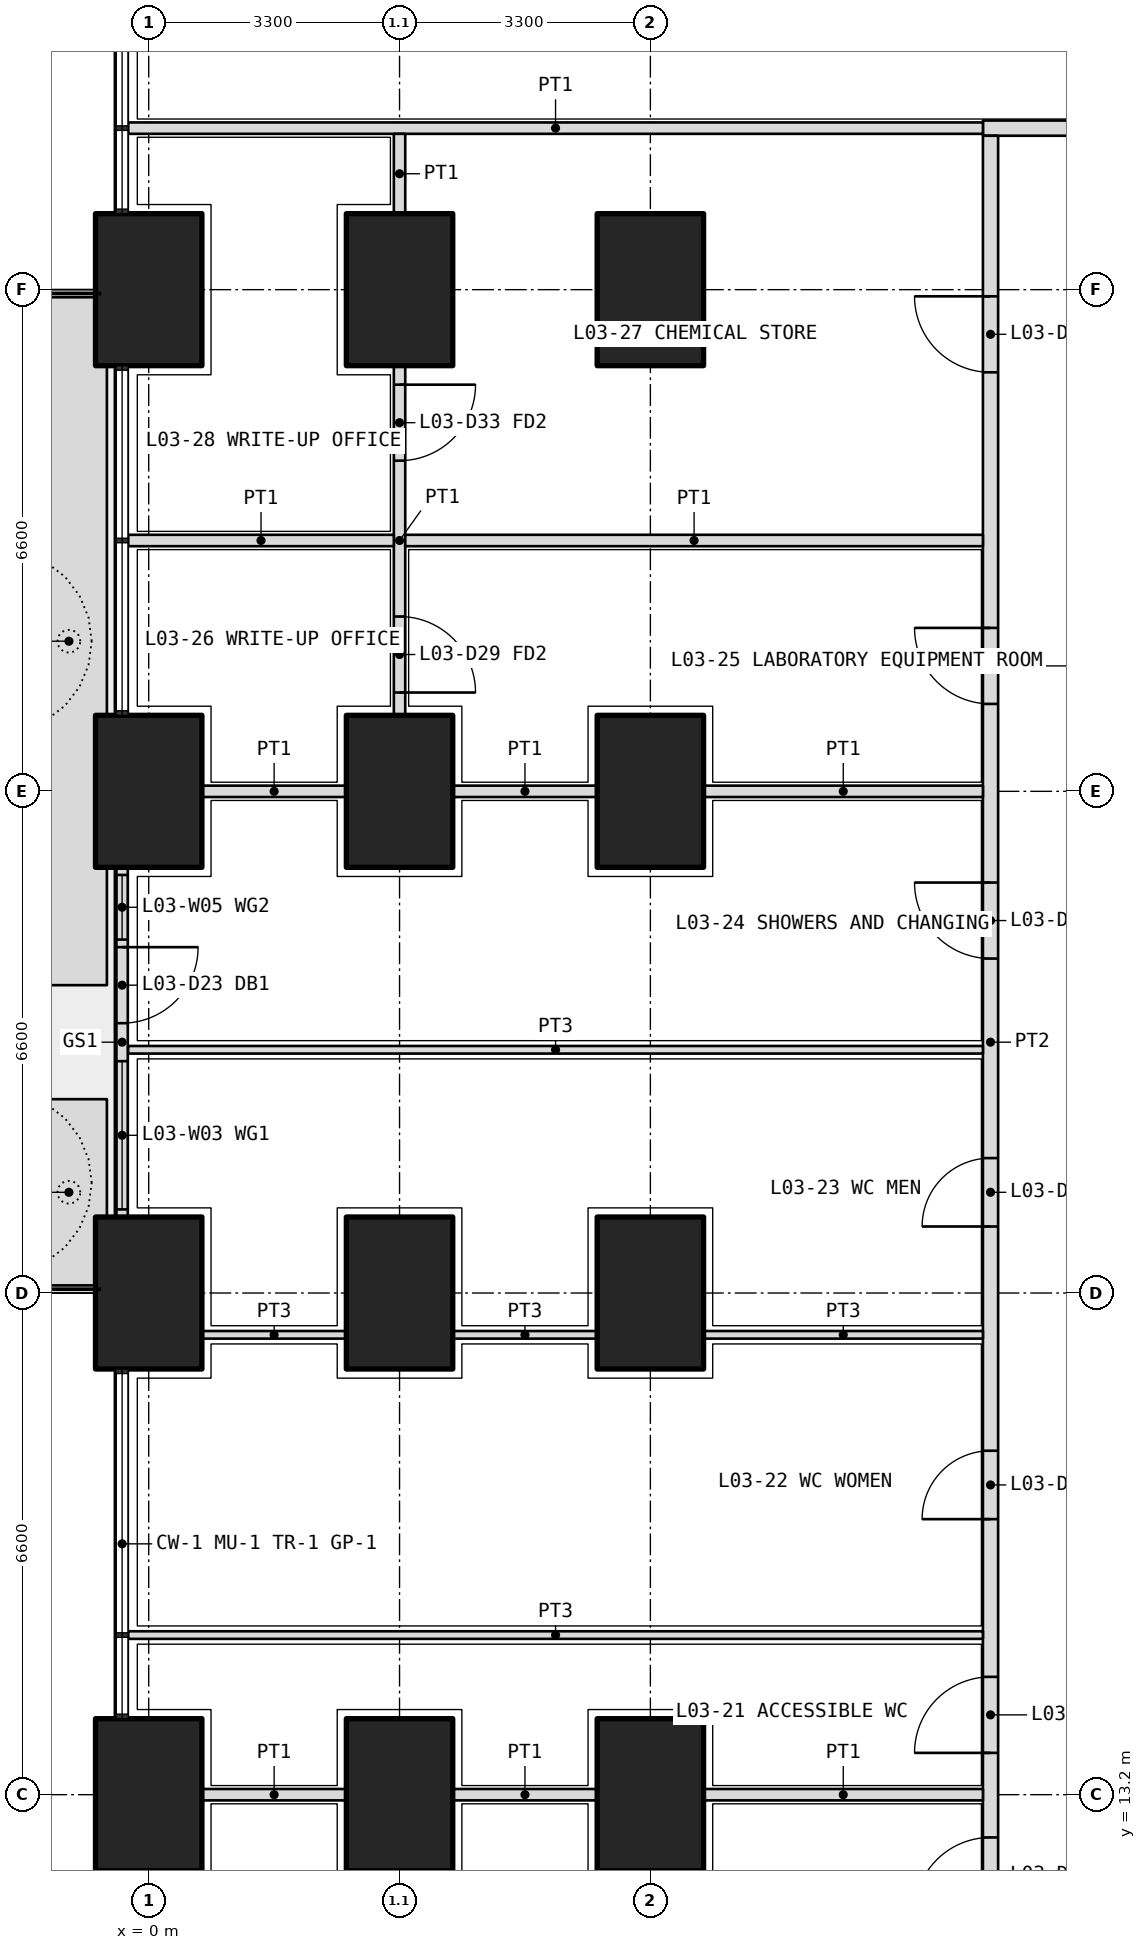
"""IFC4 building model, lengths in metres.
Left out: names, types, materials, properties, quantities, classifications, styles, units other than length and angle.
Written with IfcOpenShell. Run it as: python <this file> out.ifc"""

import sys

from ifc_helpers import new_model, si_unit, direction, frame, frame_2d, origin, origin_2d, place, context, subcontext, project, spatial, polyline, rectangle, outline, extrude, element, fill, save


model = new_model("IFC4")
c1 = context("Model", 3, precision=1e-05, world=origin(), true_north=direction((0.0, 1.0)))
c2 = subcontext(c1, "Body", "Model", "MODEL_VIEW")
j1 = project(units=[si_unit("LENGTHUNIT", "METRE"), si_unit("PLANEANGLEUNIT", "RADIAN")], contexts=[c1])
p1 = place(None, origin())
s1 = spatial("IfcSite", under=j1, at=p1, CompositionType="ELEMENT")
p2 = place(p1, origin())
s2 = spatial("IfcBuilding", under=s1, at=p2, CompositionType="ELEMENT")
p3 = place(p2, frame((0.0, 0.0, 17.1)))
s3 = spatial("IfcBuildingStorey", under=s2, at=p3, CompositionType="ELEMENT", Elevation=17.1)
for number, where, z_axis, x_axis in (
    (1, (0.0, 13.2, 0.0), (0.0, 0.0, 1.0), (0.0, 1.0, 0.0)),
    (2, (0.0, 19.8, 0.0), (0.0, 0.0, 1.0), (0.0, 1.0, 0.0)),
    (3, (0.0, 26.4, 0.0), (0.0, 0.0, 1.0), (0.0, 1.0, 0.0)),
    (4, (0.0, 33.0, 0.0), (0.0, 0.0, 1.0), (0.0, 1.0, 0.0)),
    (5, (3.3, 13.2, 0.0), (0.0, 0.0, 1.0), (0.0, 1.0, 0.0)),
    (6, (3.3, 19.8, 0.0), (0.0, 0.0, 1.0), (0.0, 1.0, 0.0)),
    (7, (3.3, 26.4, 0.0), (0.0, 0.0, 1.0), (0.0, 1.0, 0.0)),
    (8, (3.3, 33.0, 0.0), (0.0, 0.0, 1.0), (0.0, 1.0, 0.0)),
    (9, (6.6, 13.2, 0.0), (0.0, 0.0, 1.0), (0.0, 1.0, 0.0)),
    (10, (6.6, 19.8, 0.0), (0.0, 0.0, 1.0), (0.0, 1.0, 0.0)),
    (11, (6.6, 26.4, 0.0), (0.0, 0.0, 1.0), (0.0, 1.0, 0.0)),
    (12, (6.6, 33.0, 0.0), (0.0, 0.0, 1.0), (0.0, 1.0, 0.0)),
):
    element("IfcColumn", number, at=place(p3, frame(where, z_axis=z_axis, x_axis=x_axis)), inside=s3, PredefinedType="COLUMN", context=c2, shape_type="SweptSolid", body=[
        extrude(rectangle(XDim=2.0, YDim=1.4, at=origin_2d()), origin(), (0.0, 0.0, 1.0), 4.2),
    ])
p4 = place(p3, origin())
e13 = element("IfcWall", 13, at=p4, inside=s3, PredefinedType="USERDEFINED", context=c2, shape_type="SweptSolid", body=[
    extrude(outline(polyline([(-1.55, 19.9), (-0.55, 19.9), (-0.55, 22.35), (-1.55, 22.35), (-1.55, 19.9)]), holes=[polyline([(-1.4, 20.05), (-0.7, 20.05), (-0.7, 22.2), (-1.4, 22.2), (-1.4, 20.05)])]), origin(), (0.0, 0.0, 1.0), 1.05),
])
p5 = place(p3, origin())
e14 = element("IfcWall", 14, at=p5, inside=s3, PredefinedType="USERDEFINED", context=c2, shape_type="SweptSolid", body=[
    extrude(outline(polyline([(-1.55, 23.85), (-0.55, 23.85), (-0.55, 32.9), (-1.55, 32.9), (-1.55, 23.85)]), holes=[polyline([(-1.4, 24.0), (-0.7, 24.0), (-0.7, 32.75), (-1.4, 32.75), (-1.4, 24.0)])]), origin(), (0.0, 0.0, 1.0), 1.05),
])
p6 = place(p3, frame((-0.35, 25.4, 0.0), z_axis=(0.0, 0.0, 1.0), x_axis=(0.0, -1.0, 0.0)))
e15 = element("IfcWall", 15, at=p6, inside=s3, PredefinedType="SOLIDWALL", context=c2, shape_type="SweptSolid", body=[
    extrude(rectangle(XDim=4.6, YDim=0.15, at=frame_2d((2.3, 0.0))), origin(), (0.0, 0.0, 1.0), 2.7),
])
p7 = place(p6, frame((1.05, 0.0, 0.0)))
e16 = element("IfcOpeningElement", 16, at=p7, cuts=e15, PredefinedType="OPENING", context=c2, shape_type="SweptSolid", body=[
    extrude(rectangle(XDim=1.0, YDim=2.4, at=frame_2d((0.5, 1.2))), frame((0.0, 0.085, 0.0), z_axis=(0.0, -1.0, 0.0), x_axis=(1.0, 0.0, 0.0)), (0.0, 0.0, 1.0), 0.17),
])
p8 = place(p6, frame((0.1, 0.0, 0.1)))
e17 = element("IfcOpeningElement", 17, at=p8, cuts=e15, PredefinedType="OPENING", context=c2, shape_type="SweptSolid", body=[
    extrude(rectangle(XDim=0.85, YDim=2.3, at=frame_2d((0.425, 1.15))), frame((0.0, 0.085, 0.0), z_axis=(0.0, -1.0, 0.0), x_axis=(1.0, 0.0, 0.0)), (0.0, 0.0, 1.0), 0.17),
])
p9 = place(p6, frame((2.55, 0.0, 0.1)))
e18 = element("IfcOpeningElement", 18, at=p9, cuts=e15, PredefinedType="OPENING", context=c2, shape_type="SweptSolid", body=[
    extrude(rectangle(XDim=1.95, YDim=2.3, at=frame_2d((0.975, 1.15))), frame((0.0, 0.085, 0.0), z_axis=(0.0, -1.0, 0.0), x_axis=(1.0, 0.0, 0.0)), (0.0, 0.0, 1.0), 0.17),
])
p10 = place(p3, frame((10.975, 35.125, 0.0), z_axis=(0.0, 0.0, 1.0), x_axis=(1.0, 0.0, 0.0)))
e19 = element("IfcWall", 19, at=p10, inside=s3, PredefinedType="PARTITIONING", context=c2, shape_type="SweptSolid", body=[
    extrude(rectangle(XDim=30.85, YDim=0.2, at=frame_2d((15.425, 0.0))), origin(), (0.0, 0.0, 1.0), 2.85),
])
p11 = place(p10, frame((7.262, 0.0, 0.0)))
e20 = element("IfcOpeningElement", 20, at=p11, cuts=e19, PredefinedType="OPENING", context=c2, shape_type="SweptSolid", body=[
    extrude(rectangle(XDim=1.0, YDim=2.1, at=frame_2d((0.5, 1.05))), frame((0.0, 0.11, 0.0), z_axis=(0.0, -1.0, 0.0), x_axis=(1.0, 0.0, 0.0)), (0.0, 0.0, 1.0), 0.22),
])
p12 = place(p10, frame((22.587, 0.0, 0.0)))
e21 = element("IfcOpeningElement", 21, at=p12, cuts=e19, PredefinedType="OPENING", context=c2, shape_type="SweptSolid", body=[
    extrude(rectangle(XDim=1.0, YDim=2.1, at=frame_2d((0.5, 1.05))), frame((0.0, 0.11, 0.0), z_axis=(0.0, -1.0, 0.0), x_axis=(1.0, 0.0, 0.0)), (0.0, 0.0, 1.0), 0.22),
])
p13 = place(p3, frame((11.075, 11.175, 0.0), z_axis=(0.0, 0.0, 1.0), x_axis=(0.0, 1.0, 0.0)))
e22 = element("IfcWall", 22, at=p13, inside=s3, PredefinedType="PARTITIONING", context=c2, shape_type="SweptSolid", body=[
    extrude(rectangle(XDim=23.85, YDim=0.2, at=frame_2d((11.925, 0.0))), origin(), (0.0, 0.0, 1.0), 2.85),
])
p14 = place(p13, frame((0.462, 0.0, 0.0)))
e23 = element("IfcOpeningElement", 23, at=p14, cuts=e22, PredefinedType="OPENING", context=c2, shape_type="SweptSolid", body=[
    extrude(rectangle(XDim=1.0, YDim=2.1, at=frame_2d((0.5, 1.05))), frame((0.0, 0.11, 0.0), z_axis=(0.0, -1.0, 0.0), x_axis=(1.0, 0.0, 0.0)), (0.0, 0.0, 1.0), 0.22),
])
p15 = place(p13, frame((2.575, 0.0, 0.0)))
e24 = element("IfcOpeningElement", 24, at=p15, cuts=e22, PredefinedType="OPENING", context=c2, shape_type="SweptSolid", body=[
    extrude(rectangle(XDim=1.0, YDim=2.1, at=frame_2d((0.5, 1.05))), frame((0.0, 0.11, 0.0), z_axis=(0.0, -1.0, 0.0), x_axis=(1.0, 0.0, 0.0)), (0.0, 0.0, 1.0), 0.22),
])
p16 = place(p13, frame((5.65, 0.0, 0.0)))
e25 = element("IfcOpeningElement", 25, at=p16, cuts=e22, PredefinedType="OPENING", context=c2, shape_type="SweptSolid", body=[
    extrude(rectangle(XDim=0.9, YDim=2.1, at=frame_2d((0.45, 1.05))), frame((0.0, 0.11, 0.0), z_axis=(0.0, -1.0, 0.0), x_axis=(1.0, 0.0, 0.0)), (0.0, 0.0, 1.0), 0.22),
])
p17 = place(p13, frame((9.5, 0.0, 0.0)))
e26 = element("IfcOpeningElement", 26, at=p17, cuts=e22, PredefinedType="OPENING", context=c2, shape_type="SweptSolid", body=[
    extrude(rectangle(XDim=0.9, YDim=2.1, at=frame_2d((0.45, 1.05))), frame((0.0, 0.11, 0.0), z_axis=(0.0, -1.0, 0.0), x_axis=(1.0, 0.0, 0.0)), (0.0, 0.0, 1.0), 0.22),
])
p18 = place(p13, frame((13.025, 0.0, 0.0)))
e27 = element("IfcOpeningElement", 27, at=p18, cuts=e22, PredefinedType="OPENING", context=c2, shape_type="SweptSolid", body=[
    extrude(rectangle(XDim=1.0, YDim=2.1, at=frame_2d((0.5, 1.05))), frame((0.0, 0.11, 0.0), z_axis=(0.0, -1.0, 0.0), x_axis=(1.0, 0.0, 0.0)), (0.0, 0.0, 1.0), 0.22),
])
p19 = place(p13, frame((16.375, 0.0, 0.0)))
e28 = element("IfcOpeningElement", 28, at=p19, cuts=e22, PredefinedType="OPENING", context=c2, shape_type="SweptSolid", body=[
    extrude(rectangle(XDim=1.0, YDim=2.1, at=frame_2d((0.5, 1.05))), frame((0.0, 0.11, 0.0), z_axis=(0.0, -1.0, 0.0), x_axis=(1.0, 0.0, 0.0)), (0.0, 0.0, 1.0), 0.22),
])
p20 = place(p13, frame((20.738, 0.0, 0.0)))
e29 = element("IfcOpeningElement", 29, at=p20, cuts=e22, PredefinedType="OPENING", context=c2, shape_type="SweptSolid", body=[
    extrude(rectangle(XDim=1.0, YDim=2.1, at=frame_2d((0.5, 1.05))), frame((0.0, 0.11, 0.0), z_axis=(0.0, -1.0, 0.0), x_axis=(1.0, 0.0, 0.0)), (0.0, 0.0, 1.0), 0.22),
])
p21 = place(p3, frame((-0.27, 35.125, 0.0), z_axis=(0.0, 0.0, 1.0), x_axis=(1.0, 0.0, 0.0)))
e30 = element("IfcWall", 30, at=p21, inside=s3, PredefinedType="PARTITIONING", context=c2, shape_type="SweptSolid", body=[
    extrude(rectangle(XDim=11.245, YDim=0.15, at=frame_2d((5.623, 0.0))), origin(), (0.0, 0.0, 1.0), 2.7),
])
p22 = place(p3, frame((3.3, 35.05, 0.0), z_axis=(0.0, 0.0, 1.0), x_axis=(0.0, -1.0, 0.0)))
e31 = element("IfcWall", 31, at=p22, inside=s3, PredefinedType="PARTITIONING", context=c2, shape_type="SweptSolid", body=[
    extrude(rectangle(XDim=1.05, YDim=0.15, at=frame_2d((0.525, 0.0))), origin(), (0.0, 0.0, 1.0), 3.9),
])
p23 = place(p3, frame((3.3, 32.0, 0.0), z_axis=(0.0, 0.0, 1.0), x_axis=(0.0, -1.0, 0.0)))
e32 = element("IfcWall", 32, at=p23, inside=s3, PredefinedType="PARTITIONING", context=c2, shape_type="SweptSolid", body=[
    extrude(rectangle(XDim=4.6, YDim=0.15, at=frame_2d((2.3, 0.0))), origin(), (0.0, 0.0, 1.0), 3.9),
])
p24 = place(p23, frame((3.3, 0.0, 0.0)))
e33 = element("IfcOpeningElement", 33, at=p24, cuts=e32, PredefinedType="OPENING", context=c2, shape_type="SweptSolid", body=[
    extrude(rectangle(XDim=1.0, YDim=2.1, at=frame_2d((0.5, 1.05))), frame((0.0, 0.085, 0.0), z_axis=(0.0, -1.0, 0.0), x_axis=(1.0, 0.0, 0.0)), (0.0, 0.0, 1.0), 0.17),
])
p25 = place(p23, frame((0.25, 0.0, 0.0)))
e34 = element("IfcOpeningElement", 34, at=p25, cuts=e32, PredefinedType="OPENING", context=c2, shape_type="SweptSolid", body=[
    extrude(rectangle(XDim=1.0, YDim=2.1, at=frame_2d((0.5, 1.05))), frame((0.0, 0.085, 0.0), z_axis=(0.0, -1.0, 0.0), x_axis=(1.0, 0.0, 0.0)), (0.0, 0.0, 1.0), 0.17),
])
p26 = place(p3, frame((3.3, 12.2, 0.0), z_axis=(0.0, 0.0, 1.0), x_axis=(0.0, -1.0, 0.0)))
e35 = element("IfcWall", 35, at=p26, inside=s3, PredefinedType="PARTITIONING", context=c2, shape_type="SweptSolid", body=[
    extrude(rectangle(XDim=4.6, YDim=0.15, at=frame_2d((2.3, 0.0))), origin(), (0.0, 0.0, 1.0), 3.9),
])
p27 = place(p26, frame((3.35, 0.0, 0.0)))
e36 = element("IfcOpeningElement", 36, at=p27, cuts=e35, PredefinedType="OPENING", context=c2, shape_type="SweptSolid", body=[
    extrude(rectangle(XDim=1.0, YDim=2.1, at=frame_2d((0.5, 1.05))), frame((0.0, 0.085, 0.0), z_axis=(0.0, -1.0, 0.0), x_axis=(1.0, 0.0, 0.0)), (0.0, 0.0, 1.0), 0.17),
])
p28 = place(p3, frame((-0.27, 15.3, 0.0), z_axis=(0.0, 0.0, 1.0), x_axis=(1.0, 0.0, 0.0)))
e37 = element("IfcWall", 37, at=p28, inside=s3, PredefinedType="PARTITIONING", context=c2, shape_type="SweptSolid", body=[
    extrude(rectangle(XDim=11.245, YDim=0.1, at=frame_2d((5.623, 0.0))), origin(), (0.0, 0.0, 1.0), 2.7),
])
p29 = place(p3, frame((0.7, 19.25, 0.0), z_axis=(0.0, 0.0, 1.0), x_axis=(1.0, 0.0, 0.0)))
e38 = element("IfcWall", 38, at=p29, inside=s3, PredefinedType="PARTITIONING", context=c2, shape_type="SweptSolid", body=[
    extrude(rectangle(XDim=1.9, YDim=0.1, at=frame_2d((0.95, 0.0))), origin(), (0.0, 0.0, 1.0), 2.85),
])
p30 = place(p3, frame((4.0, 19.25, 0.0), z_axis=(0.0, 0.0, 1.0), x_axis=(1.0, 0.0, 0.0)))
e39 = element("IfcWall", 39, at=p30, inside=s3, PredefinedType="PARTITIONING", context=c2, shape_type="SweptSolid", body=[
    extrude(rectangle(XDim=1.9, YDim=0.1, at=frame_2d((0.95, 0.0))), origin(), (0.0, 0.0, 1.0), 2.85),
])
p31 = place(p3, frame((7.3, 19.25, 0.0), z_axis=(0.0, 0.0, 1.0), x_axis=(1.0, 0.0, 0.0)))
e40 = element("IfcWall", 40, at=p31, inside=s3, PredefinedType="PARTITIONING", context=c2, shape_type="SweptSolid", body=[
    extrude(rectangle(XDim=3.675, YDim=0.1, at=frame_2d((1.837, 0.0))), origin(), (0.0, 0.0, 1.0), 2.85),
])
p32 = place(p3, frame((-0.27, 23.0, 0.0), z_axis=(0.0, 0.0, 1.0), x_axis=(1.0, 0.0, 0.0)))
e41 = element("IfcWall", 41, at=p32, inside=s3, PredefinedType="PARTITIONING", context=c2, shape_type="SweptSolid", body=[
    extrude(rectangle(XDim=11.245, YDim=0.1, at=frame_2d((5.623, 0.0))), origin(), (0.0, 0.0, 1.0), 2.7),
])
p33 = place(p3, frame((0.7, 13.2, 0.0), z_axis=(0.0, 0.0, 1.0), x_axis=(1.0, 0.0, 0.0)))
e42 = element("IfcWall", 42, at=p33, inside=s3, PredefinedType="PARTITIONING", context=c2, shape_type="SweptSolid", body=[
    extrude(rectangle(XDim=1.9, YDim=0.15, at=frame_2d((0.95, 0.0))), origin(), (0.0, 0.0, 1.0), 2.85),
])
p34 = place(p3, frame((4.0, 13.2, 0.0), z_axis=(0.0, 0.0, 1.0), x_axis=(1.0, 0.0, 0.0)))
e43 = element("IfcWall", 43, at=p34, inside=s3, PredefinedType="PARTITIONING", context=c2, shape_type="SweptSolid", body=[
    extrude(rectangle(XDim=1.9, YDim=0.15, at=frame_2d((0.95, 0.0))), origin(), (0.0, 0.0, 1.0), 2.85),
])
p35 = place(p3, frame((7.3, 13.2, 0.0), z_axis=(0.0, 0.0, 1.0), x_axis=(1.0, 0.0, 0.0)))
e44 = element("IfcWall", 44, at=p35, inside=s3, PredefinedType="PARTITIONING", context=c2, shape_type="SweptSolid", body=[
    extrude(rectangle(XDim=3.675, YDim=0.15, at=frame_2d((1.837, 0.0))), origin(), (0.0, 0.0, 1.0), 2.85),
])
p36 = place(p3, frame((0.7, 26.4, 0.0), z_axis=(0.0, 0.0, 1.0), x_axis=(1.0, 0.0, 0.0)))
e45 = element("IfcWall", 45, at=p36, inside=s3, PredefinedType="PARTITIONING", context=c2, shape_type="SweptSolid", body=[
    extrude(rectangle(XDim=1.9, YDim=0.15, at=frame_2d((0.95, 0.0))), origin(), (0.0, 0.0, 1.0), 2.85),
])
p37 = place(p3, frame((4.0, 26.4, 0.0), z_axis=(0.0, 0.0, 1.0), x_axis=(1.0, 0.0, 0.0)))
e46 = element("IfcWall", 46, at=p37, inside=s3, PredefinedType="PARTITIONING", context=c2, shape_type="SweptSolid", body=[
    extrude(rectangle(XDim=1.9, YDim=0.15, at=frame_2d((0.95, 0.0))), origin(), (0.0, 0.0, 1.0), 2.85),
])
p38 = place(p3, frame((7.3, 26.4, 0.0), z_axis=(0.0, 0.0, 1.0), x_axis=(1.0, 0.0, 0.0)))
e47 = element("IfcWall", 47, at=p38, inside=s3, PredefinedType="PARTITIONING", context=c2, shape_type="SweptSolid", body=[
    extrude(rectangle(XDim=3.675, YDim=0.15, at=frame_2d((1.837, 0.0))), origin(), (0.0, 0.0, 1.0), 2.85),
])
p39 = place(p3, frame((-0.27, 29.7, 0.0), z_axis=(0.0, 0.0, 1.0), x_axis=(1.0, 0.0, 0.0)))
e48 = element("IfcWall", 48, at=p39, inside=s3, PredefinedType="PARTITIONING", context=c2, shape_type="SweptSolid", body=[
    extrude(rectangle(XDim=3.495, YDim=0.15, at=frame_2d((1.748, 0.0))), origin(), (0.0, 0.0, 1.0), 2.7),
])
p40 = place(p3, frame((3.375, 29.7, 0.0), z_axis=(0.0, 0.0, 1.0), x_axis=(1.0, 0.0, 0.0)))
e49 = element("IfcWall", 49, at=p40, inside=s3, PredefinedType="PARTITIONING", context=c2, shape_type="SweptSolid", body=[
    extrude(rectangle(XDim=7.6, YDim=0.15, at=frame_2d((3.8, 0.0))), origin(), (0.0, 0.0, 1.0), 3.9),
])
p41 = place(p7, origin())
e50 = element("IfcDoor", 50, at=p41, inside=s3, OperationType="SINGLE_SWING_LEFT", PredefinedType="DOOR", context=c2, shape_type="SweptSolid", body=[
    extrude(rectangle(XDim=1.0, YDim=2.4, at=frame_2d((0.5, 1.2))), frame((0.0, 0.025, 0.0), z_axis=(0.0, -1.0, 0.0), x_axis=(1.0, 0.0, 0.0)), (0.0, 0.0, 1.0), 0.05),
])
fill(e16, e50)
p42 = place(p8, origin())
e51 = element("IfcWindow", 51, at=p42, inside=s3, PartitioningType="SINGLE_PANEL", PredefinedType="WINDOW", context=c2, shape_type="SweptSolid", body=[
    extrude(rectangle(XDim=0.85, YDim=2.3, at=frame_2d((0.425, 1.15))), frame((0.0, 0.03, 0.0), z_axis=(0.0, -1.0, 0.0), x_axis=(1.0, 0.0, 0.0)), (0.0, 0.0, 1.0), 0.06),
])
fill(e17, e51)
p43 = place(p9, origin())
e52 = element("IfcWindow", 52, at=p43, inside=s3, PartitioningType="SINGLE_PANEL", PredefinedType="WINDOW", context=c2, shape_type="SweptSolid", body=[
    extrude(rectangle(XDim=1.95, YDim=2.3, at=frame_2d((0.975, 1.15))), frame((0.0, 0.03, 0.0), z_axis=(0.0, -1.0, 0.0), x_axis=(1.0, 0.0, 0.0)), (0.0, 0.0, 1.0), 0.06),
])
fill(e18, e52)
p44 = place(p14, origin())
e53 = element("IfcDoor", 53, at=p44, inside=s3, OperationType="SINGLE_SWING_LEFT", PredefinedType="DOOR", context=c2, shape_type="SweptSolid", body=[
    extrude(rectangle(XDim=1.0, YDim=2.1, at=frame_2d((0.5, 1.05))), frame((0.0, 0.025, 0.0), z_axis=(0.0, -1.0, 0.0), x_axis=(1.0, 0.0, 0.0)), (0.0, 0.0, 1.0), 0.05),
])
fill(e23, e53)
p45 = place(p15, origin())
e54 = element("IfcDoor", 54, at=p45, inside=s3, OperationType="SINGLE_SWING_LEFT", PredefinedType="DOOR", context=c2, shape_type="SweptSolid", body=[
    extrude(rectangle(XDim=1.0, YDim=2.1, at=frame_2d((0.5, 1.05))), frame((0.0, 0.025, 0.0), z_axis=(0.0, -1.0, 0.0), x_axis=(1.0, 0.0, 0.0)), (0.0, 0.0, 1.0), 0.05),
])
fill(e24, e54)
p46 = place(p16, origin())
e55 = element("IfcDoor", 55, at=p46, inside=s3, OperationType="SINGLE_SWING_LEFT", PredefinedType="DOOR", context=c2, shape_type="SweptSolid", body=[
    extrude(rectangle(XDim=0.9, YDim=2.1, at=frame_2d((0.45, 1.05))), frame((0.0, 0.025, 0.0), z_axis=(0.0, -1.0, 0.0), x_axis=(1.0, 0.0, 0.0)), (0.0, 0.0, 1.0), 0.05),
])
fill(e25, e55)
p47 = place(p17, origin())
e56 = element("IfcDoor", 56, at=p47, inside=s3, OperationType="SINGLE_SWING_LEFT", PredefinedType="DOOR", context=c2, shape_type="SweptSolid", body=[
    extrude(rectangle(XDim=0.9, YDim=2.1, at=frame_2d((0.45, 1.05))), frame((0.0, 0.025, 0.0), z_axis=(0.0, -1.0, 0.0), x_axis=(1.0, 0.0, 0.0)), (0.0, 0.0, 1.0), 0.05),
])
fill(e26, e56)
p48 = place(p18, origin())
e57 = element("IfcDoor", 57, at=p48, inside=s3, OperationType="SINGLE_SWING_RIGHT", PredefinedType="DOOR", context=c2, shape_type="SweptSolid", body=[
    extrude(rectangle(XDim=1.0, YDim=2.1, at=frame_2d((0.5, 1.05))), frame((0.0, 0.025, 0.0), z_axis=(0.0, -1.0, 0.0), x_axis=(1.0, 0.0, 0.0)), (0.0, 0.0, 1.0), 0.05),
])
fill(e27, e57)
p49 = place(p19, origin())
e58 = element("IfcDoor", 58, at=p49, inside=s3, OperationType="SINGLE_SWING_RIGHT", PredefinedType="DOOR", context=c2, shape_type="SweptSolid", body=[
    extrude(rectangle(XDim=1.0, YDim=2.1, at=frame_2d((0.5, 1.05))), frame((0.0, 0.025, 0.0), z_axis=(0.0, -1.0, 0.0), x_axis=(1.0, 0.0, 0.0)), (0.0, 0.0, 1.0), 0.05),
])
fill(e28, e58)
p50 = place(p24, origin())
e59 = element("IfcDoor", 59, at=p50, inside=s3, OperationType="SINGLE_SWING_RIGHT", PredefinedType="DOOR", context=c2, shape_type="SweptSolid", body=[
    extrude(rectangle(XDim=1.0, YDim=2.1, at=frame_2d((0.5, 1.05))), frame((0.0, 0.025, 0.0), z_axis=(0.0, -1.0, 0.0), x_axis=(1.0, 0.0, 0.0)), (0.0, 0.0, 1.0), 0.05),
])
fill(e33, e59)
p51 = place(p20, origin())
e60 = element("IfcDoor", 60, at=p51, inside=s3, OperationType="SINGLE_SWING_RIGHT", PredefinedType="DOOR", context=c2, shape_type="SweptSolid", body=[
    extrude(rectangle(XDim=1.0, YDim=2.1, at=frame_2d((0.5, 1.05))), frame((0.0, 0.025, 0.0), z_axis=(0.0, -1.0, 0.0), x_axis=(1.0, 0.0, 0.0)), (0.0, 0.0, 1.0), 0.05),
])
fill(e29, e60)
p52 = place(p25, origin())
e61 = element("IfcDoor", 61, at=p52, inside=s3, OperationType="SINGLE_SWING_LEFT", PredefinedType="DOOR", context=c2, shape_type="SweptSolid", body=[
    extrude(rectangle(XDim=1.0, YDim=2.1, at=frame_2d((0.5, 1.05))), frame((0.0, 0.025, 0.0), z_axis=(0.0, -1.0, 0.0), x_axis=(1.0, 0.0, 0.0)), (0.0, 0.0, 1.0), 0.05),
])
fill(e34, e61)
save(model, sys.argv[1])
